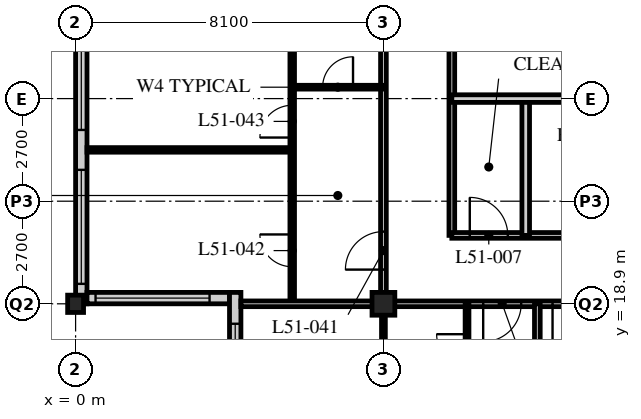
"""IFC4 building model, lengths in metres.
Left out: names, types, materials, properties, quantities, classifications, styles, units other than length and angle.
Written with IfcOpenShell. Run it as: python <this file> out.ifc"""

import sys

from ifc_helpers import new_model, si_unit, direction, frame, frame_2d, origin, origin_2d, place, context, subcontext, project, spatial, rectangle, hollow_rectangle, i_section, extrude, element, fill, save


model = new_model("IFC4")
c1 = context("Model", 3, precision=1e-05, world=origin(), true_north=direction((0.0, 1.0)))
c2 = subcontext(c1, "Body", "Model", "MODEL_VIEW")
j1 = project(units=[si_unit("LENGTHUNIT", "METRE"), si_unit("PLANEANGLEUNIT", "RADIAN")], contexts=[c1])
p1 = place(None, origin())
s1 = spatial("IfcSite", under=j1, at=p1, CompositionType="ELEMENT")
p2 = place(p1, origin())
s2 = spatial("IfcBuilding", under=s1, at=p2, CompositionType="ELEMENT")
p3 = place(p2, frame((0.0, 0.0, 199.2)))
s3 = spatial("IfcBuildingStorey", under=s2, at=p3, CompositionType="ELEMENT", Elevation=199.2)
p4 = place(p3, frame((0.0, 18.9, 0.0), z_axis=(0.0, 0.0, 1.0), x_axis=(1.0, 0.0, 0.0)))
e1 = element("IfcColumn", 1, at=p4, inside=s3, PredefinedType="COLUMN", context=c2, shape_type="SweptSolid", body=[
    extrude(i_section(OverallWidth=0.418, OverallDepth=0.456, WebThickness=0.042, FlangeThickness=0.067, FilletRadius=0.015, at=origin_2d()), origin(), (0.0, 0.0, 1.0), 3.6),
])
p5 = place(p3, frame((8.1, 18.9, 0.0), z_axis=(0.0, 0.0, 1.0), x_axis=(1.0, 0.0, 0.0)))
e2 = element("IfcColumn", 2, at=p5, inside=s3, PredefinedType="COLUMN", context=c2, shape_type="SweptSolid", body=[
    extrude(hollow_rectangle(XDim=0.6, YDim=0.6, WallThickness=0.05, at=origin_2d()), origin(), (0.0, 0.0, 1.0), 3.6),
])
p6 = place(p3, frame((0.15, 51.0, 0.0), z_axis=(0.0, 0.0, 1.0), x_axis=(0.0, -1.0, 0.0)))
e3 = element("IfcWall", 3, at=p6, inside=s3, PredefinedType="SOLIDWALL", context=c2, shape_type="SweptSolid", body=[
    extrude(rectangle(XDim=32.1, YDim=0.3, at=frame_2d((16.05, 0.0))), origin(), (0.0, 0.0, 1.0), 3.39),
])
p7 = place(p6, frame((0.225, 0.0, 0.6)))
e4 = element("IfcOpeningElement", 4, at=p7, cuts=e3, PredefinedType="OPENING", context=c2, shape_type="SweptSolid", body=[
    extrude(rectangle(XDim=3.0, YDim=2.4, at=frame_2d((1.5, 1.2))), frame((0.0, 0.16, 0.0), z_axis=(0.0, -1.0, 0.0), x_axis=(1.0, 0.0, 0.0)), (0.0, 0.0, 1.0), 0.32),
])
p8 = place(p6, frame((4.275, 0.0, 0.6)))
e5 = element("IfcOpeningElement", 5, at=p8, cuts=e3, PredefinedType="OPENING", context=c2, shape_type="SweptSolid", body=[
    extrude(rectangle(XDim=3.0, YDim=2.4, at=frame_2d((1.5, 1.2))), frame((0.0, 0.16, 0.0), z_axis=(0.0, -1.0, 0.0), x_axis=(1.0, 0.0, 0.0)), (0.0, 0.0, 1.0), 0.32),
])
p9 = place(p6, frame((8.325, 0.0, 0.6)))
e6 = element("IfcOpeningElement", 6, at=p9, cuts=e3, PredefinedType="OPENING", context=c2, shape_type="SweptSolid", body=[
    extrude(rectangle(XDim=3.0, YDim=2.4, at=frame_2d((1.5, 1.2))), frame((0.0, 0.16, 0.0), z_axis=(0.0, -1.0, 0.0), x_axis=(1.0, 0.0, 0.0)), (0.0, 0.0, 1.0), 0.32),
])
p10 = place(p6, frame((12.375, 0.0, 0.6)))
e7 = element("IfcOpeningElement", 7, at=p10, cuts=e3, PredefinedType="OPENING", context=c2, shape_type="SweptSolid", body=[
    extrude(rectangle(XDim=3.0, YDim=2.4, at=frame_2d((1.5, 1.2))), frame((0.0, 0.16, 0.0), z_axis=(0.0, -1.0, 0.0), x_axis=(1.0, 0.0, 0.0)), (0.0, 0.0, 1.0), 0.32),
])
p11 = place(p6, frame((16.425, 0.0, 0.6)))
e8 = element("IfcOpeningElement", 8, at=p11, cuts=e3, PredefinedType="OPENING", context=c2, shape_type="SweptSolid", body=[
    extrude(rectangle(XDim=3.0, YDim=2.4, at=frame_2d((1.5, 1.2))), frame((0.0, 0.16, 0.0), z_axis=(0.0, -1.0, 0.0), x_axis=(1.0, 0.0, 0.0)), (0.0, 0.0, 1.0), 0.32),
])
p12 = place(p6, frame((20.475, 0.0, 0.6)))
e9 = element("IfcOpeningElement", 9, at=p12, cuts=e3, PredefinedType="OPENING", context=c2, shape_type="SweptSolid", body=[
    extrude(rectangle(XDim=3.0, YDim=2.4, at=frame_2d((1.5, 1.2))), frame((0.0, 0.16, 0.0), z_axis=(0.0, -1.0, 0.0), x_axis=(1.0, 0.0, 0.0)), (0.0, 0.0, 1.0), 0.32),
])
p13 = place(p6, frame((24.525, 0.0, 0.6)))
e10 = element("IfcOpeningElement", 10, at=p13, cuts=e3, PredefinedType="OPENING", context=c2, shape_type="SweptSolid", body=[
    extrude(rectangle(XDim=3.0, YDim=2.4, at=frame_2d((1.5, 1.2))), frame((0.0, 0.16, 0.0), z_axis=(0.0, -1.0, 0.0), x_axis=(1.0, 0.0, 0.0)), (0.0, 0.0, 1.0), 0.32),
])
p14 = place(p6, frame((28.575, 0.0, 0.6)))
e11 = element("IfcOpeningElement", 11, at=p14, cuts=e3, PredefinedType="OPENING", context=c2, shape_type="SweptSolid", body=[
    extrude(rectangle(XDim=3.0, YDim=2.4, at=frame_2d((1.5, 1.2))), frame((0.0, 0.16, 0.0), z_axis=(0.0, -1.0, 0.0), x_axis=(1.0, 0.0, 0.0)), (0.0, 0.0, 1.0), 0.32),
])
p15 = place(p3, frame((0.3, 19.05, 0.0), z_axis=(0.0, 0.0, 1.0), x_axis=(1.0, 0.0, 0.0)))
e12 = element("IfcWall", 12, at=p15, inside=s3, PredefinedType="SOLIDWALL", context=c2, shape_type="SweptSolid", body=[
    extrude(rectangle(XDim=3.75, YDim=0.3, at=frame_2d((1.875, 0.0))), origin(), (0.0, 0.0, 1.0), 3.39),
])
p16 = place(p15, frame((0.225, 0.0, 0.6)))
e13 = element("IfcOpeningElement", 13, at=p16, cuts=e12, PredefinedType="OPENING", context=c2, shape_type="SweptSolid", body=[
    extrude(rectangle(XDim=3.0, YDim=2.0, at=frame_2d((1.5, 1.0))), frame((0.0, 0.16, 0.0), z_axis=(0.0, -1.0, 0.0), x_axis=(1.0, 0.0, 0.0)), (0.0, 0.0, 1.0), 0.32),
])
p17 = place(p3, frame((4.2, 19.2, 0.0), z_axis=(0.0, 0.0, 1.0), x_axis=(0.0, -1.0, 0.0)))
e14 = element("IfcWall", 14, at=p17, inside=s3, PredefinedType="SOLIDWALL", context=c2, shape_type="SweptSolid", body=[
    extrude(rectangle(XDim=4.35, YDim=0.3, at=frame_2d((2.175, 0.0))), origin(), (0.0, 0.0, 1.0), 3.39),
])
p18 = place(p17, frame((0.825, 0.0, 0.6)))
e15 = element("IfcOpeningElement", 15, at=p18, cuts=e14, PredefinedType="OPENING", context=c2, shape_type="SweptSolid", body=[
    extrude(rectangle(XDim=3.0, YDim=2.0, at=frame_2d((1.5, 1.0))), frame((0.0, 0.16, 0.0), z_axis=(0.0, -1.0, 0.0), x_axis=(1.0, 0.0, 0.0)), (0.0, 0.0, 1.0), 0.32),
])
p19 = place(p3, frame((8.1, 18.9, 0.0), z_axis=(0.0, 0.0, 1.0), x_axis=(1.0, 0.0, 0.0)))
e16 = element("IfcWall", 16, at=p19, inside=s3, PredefinedType="PARTITIONING", context=c2, shape_type="SweptSolid", body=[
    extrude(rectangle(XDim=40.5, YDim=0.15, at=frame_2d((20.25, 0.0))), origin(), (0.0, 0.0, 1.0), 2.778),
])
p20 = place(p19, frame((4.45, 0.0, 0.0)))
e17 = element("IfcOpeningElement", 17, at=p20, cuts=e16, PredefinedType="OPENING", context=c2, shape_type="SweptSolid", body=[
    extrude(rectangle(XDim=1.0, YDim=2.1, at=frame_2d((0.5, 1.05))), frame((0.0, 0.085, 0.0), z_axis=(0.0, -1.0, 0.0), x_axis=(1.0, 0.0, 0.0)), (0.0, 0.0, 1.0), 0.17),
])
p21 = place(p19, frame((17.1, 0.0, 0.0)))
e18 = element("IfcOpeningElement", 18, at=p21, cuts=e16, PredefinedType="OPENING", context=c2, shape_type="SweptSolid", body=[
    extrude(rectangle(XDim=1.0, YDim=2.1, at=frame_2d((0.5, 1.05))), frame((0.0, 0.085, 0.0), z_axis=(0.0, -1.0, 0.0), x_axis=(1.0, 0.0, 0.0)), (0.0, 0.0, 1.0), 0.17),
])
p22 = place(p19, frame((28.75, 0.0, 0.0)))
e19 = element("IfcOpeningElement", 19, at=p22, cuts=e16, PredefinedType="OPENING", context=c2, shape_type="SweptSolid", body=[
    extrude(rectangle(XDim=1.0, YDim=2.1, at=frame_2d((0.5, 1.05))), frame((0.0, 0.085, 0.0), z_axis=(0.0, -1.0, 0.0), x_axis=(1.0, 0.0, 0.0)), (0.0, 0.0, 1.0), 0.17),
])
p23 = place(p19, frame((2.625, 0.0, 0.0)))
e20 = element("IfcOpeningElement", 20, at=p23, cuts=e16, PredefinedType="OPENING", context=c2, shape_type="SweptSolid", body=[
    extrude(rectangle(XDim=1.0, YDim=2.1, at=frame_2d((0.5, 1.05))), frame((0.0, 0.085, 0.0), z_axis=(0.0, -1.0, 0.0), x_axis=(1.0, 0.0, 0.0)), (0.0, 0.0, 1.0), 0.17),
])
p24 = place(p19, frame((36.875, 0.0, 0.0)))
e21 = element("IfcOpeningElement", 21, at=p24, cuts=e16, PredefinedType="OPENING", context=c2, shape_type="SweptSolid", body=[
    extrude(rectangle(XDim=1.0, YDim=2.1, at=frame_2d((0.5, 1.05))), frame((0.0, 0.085, 0.0), z_axis=(0.0, -1.0, 0.0), x_axis=(1.0, 0.0, 0.0)), (0.0, 0.0, 1.0), 0.17),
])
p25 = place(p3, frame((8.1, 18.9, 0.0), z_axis=(0.0, 0.0, 1.0), x_axis=(0.0, 1.0, 0.0)))
e22 = element("IfcWall", 22, at=p25, inside=s3, PredefinedType="PARTITIONING", context=c2, shape_type="SweptSolid", body=[
    extrude(rectangle(XDim=24.3, YDim=0.15, at=frame_2d((12.15, 0.0))), origin(), (0.0, 0.0, 1.0), 2.778),
])
p26 = place(p25, frame((0.9, 0.0, 0.0)))
e23 = element("IfcOpeningElement", 23, at=p26, cuts=e22, PredefinedType="OPENING", context=c2, shape_type="SweptSolid", body=[
    extrude(rectangle(XDim=1.0, YDim=2.1, at=frame_2d((0.5, 1.05))), frame((0.0, 0.085, 0.0), z_axis=(0.0, -1.0, 0.0), x_axis=(1.0, 0.0, 0.0)), (0.0, 0.0, 1.0), 0.17),
])
p27 = place(p25, frame((9.0, 0.0, 0.0)))
e24 = element("IfcOpeningElement", 24, at=p27, cuts=e22, PredefinedType="OPENING", context=c2, shape_type="SweptSolid", body=[
    extrude(rectangle(XDim=1.0, YDim=2.1, at=frame_2d((0.5, 1.05))), frame((0.0, 0.085, 0.0), z_axis=(0.0, -1.0, 0.0), x_axis=(1.0, 0.0, 0.0)), (0.0, 0.0, 1.0), 0.17),
])
p28 = place(p25, frame((17.1, 0.0, 0.0)))
e25 = element("IfcOpeningElement", 25, at=p28, cuts=e22, PredefinedType="OPENING", context=c2, shape_type="SweptSolid", body=[
    extrude(rectangle(XDim=1.0, YDim=2.1, at=frame_2d((0.5, 1.05))), frame((0.0, 0.085, 0.0), z_axis=(0.0, -1.0, 0.0), x_axis=(1.0, 0.0, 0.0)), (0.0, 0.0, 1.0), 0.17),
])
p29 = place(p3, frame((9.9, 40.5, 0.0), z_axis=(0.0, 0.0, 1.0), x_axis=(0.0, -1.0, 0.0)))
e26 = element("IfcWall", 26, at=p29, inside=s3, PredefinedType="PARTITIONING", context=c2, shape_type="SweptSolid", body=[
    extrude(rectangle(XDim=19.8, YDim=0.15, at=frame_2d((9.9, 0.0))), origin(), (0.0, 0.0, 1.0), 3.39),
])
p30 = place(p29, frame((11.65, 0.0, 0.0)))
e27 = element("IfcOpeningElement", 27, at=p30, cuts=e26, PredefinedType="OPENING", context=c2, shape_type="SweptSolid", body=[
    extrude(rectangle(XDim=1.0, YDim=2.1, at=frame_2d((0.5, 1.05))), frame((0.0, 0.085, 0.0), z_axis=(0.0, -1.0, 0.0), x_axis=(1.0, 0.0, 0.0)), (0.0, 0.0, 1.0), 0.17),
])
p31 = place(p29, frame((3.55, 0.0, 0.0)))
e28 = element("IfcOpeningElement", 28, at=p31, cuts=e26, PredefinedType="OPENING", context=c2, shape_type="SweptSolid", body=[
    extrude(rectangle(XDim=1.0, YDim=2.1, at=frame_2d((0.5, 1.05))), frame((0.0, 0.085, 0.0), z_axis=(0.0, -1.0, 0.0), x_axis=(1.0, 0.0, 0.0)), (0.0, 0.0, 1.0), 0.17),
])
p32 = place(p3, frame((9.9, 20.7, 0.0), z_axis=(0.0, 0.0, 1.0), x_axis=(1.0, 0.0, 0.0)))
e29 = element("IfcWall", 29, at=p32, inside=s3, PredefinedType="PARTITIONING", context=c2, shape_type="SweptSolid", body=[
    extrude(rectangle(XDim=17.24, YDim=0.15, at=frame_2d((8.62, 0.0))), origin(), (0.0, 0.0, 1.0), 3.39),
])
p33 = place(p32, frame((0.472, 0.0, 0.0)))
e30 = element("IfcOpeningElement", 30, at=p33, cuts=e29, PredefinedType="OPENING", context=c2, shape_type="SweptSolid", body=[
    extrude(rectangle(XDim=1.0, YDim=2.1, at=frame_2d((0.5, 1.05))), frame((0.0, 0.085, 0.0), z_axis=(0.0, -1.0, 0.0), x_axis=(1.0, 0.0, 0.0)), (0.0, 0.0, 1.0), 0.17),
])
p34 = place(p32, frame((3.622, 0.0, 0.0)))
e31 = element("IfcOpeningElement", 31, at=p34, cuts=e29, PredefinedType="OPENING", context=c2, shape_type="SweptSolid", body=[
    extrude(rectangle(XDim=1.0, YDim=2.1, at=frame_2d((0.5, 1.05))), frame((0.0, 0.085, 0.0), z_axis=(0.0, -1.0, 0.0), x_axis=(1.0, 0.0, 0.0)), (0.0, 0.0, 1.0), 0.17),
])
p35 = place(p32, frame((9.828, 0.0, 0.0)))
e32 = element("IfcOpeningElement", 32, at=p35, cuts=e29, PredefinedType="OPENING", context=c2, shape_type="SweptSolid", body=[
    extrude(rectangle(XDim=1.0, YDim=2.1, at=frame_2d((0.5, 1.05))), frame((0.0, 0.085, 0.0), z_axis=(0.0, -1.0, 0.0), x_axis=(1.0, 0.0, 0.0)), (0.0, 0.0, 1.0), 0.17),
])
p36 = place(p32, frame((15.303, 0.0, 0.0)))
e33 = element("IfcOpeningElement", 33, at=p36, cuts=e29, PredefinedType="OPENING", context=c2, shape_type="SweptSolid", body=[
    extrude(rectangle(XDim=1.0, YDim=2.1, at=frame_2d((0.5, 1.05))), frame((0.0, 0.085, 0.0), z_axis=(0.0, -1.0, 0.0), x_axis=(1.0, 0.0, 0.0)), (0.0, 0.0, 1.0), 0.17),
])
p37 = place(p3, frame((11.844, 20.7, 0.0), z_axis=(0.0, 0.0, 1.0), x_axis=(0.0, 1.0, 0.0)))
e34 = element("IfcWall", 34, at=p37, inside=s3, PredefinedType="SOLIDWALL", context=c2, shape_type="SweptSolid", body=[
    extrude(rectangle(XDim=3.6, YDim=0.2, at=frame_2d((1.8, 0.0))), origin(), (0.0, 0.0, 1.0), 3.39),
])
p38 = place(p3, frame((9.9, 24.3, 0.0), z_axis=(0.0, 0.0, 1.0), x_axis=(1.0, 0.0, 0.0)))
e35 = element("IfcWall", 35, at=p38, inside=s3, PredefinedType="SOLIDWALL", context=c2, shape_type="SweptSolid", body=[
    extrude(rectangle(XDim=6.3, YDim=0.2, at=frame_2d((3.15, 0.0))), origin(), (0.0, 0.0, 1.0), 3.39),
])
p39 = place(p3, frame((5.7, 18.9, 0.0), z_axis=(0.0, 0.0, 1.0), x_axis=(0.0, 1.0, 0.0)))
e36 = element("IfcWall", 36, at=p39, inside=s3, PredefinedType="PARTITIONING", context=c2, shape_type="SweptSolid", body=[
    extrude(rectangle(XDim=24.3, YDim=0.12, at=frame_2d((12.15, 0.0))), origin(), (0.0, 0.0, 1.0), 3.39),
])
p40 = place(p39, frame((0.975, 0.0, 0.0)))
e37 = element("IfcOpeningElement", 37, at=p40, cuts=e36, PredefinedType="OPENING", context=c2, shape_type="SweptSolid", body=[
    extrude(rectangle(XDim=0.85, YDim=2.1, at=frame_2d((0.425, 1.05))), frame((0.0, 0.07, 0.0), z_axis=(0.0, -1.0, 0.0), x_axis=(1.0, 0.0, 0.0)), (0.0, 0.0, 1.0), 0.14),
])
p41 = place(p39, frame((4.375, 0.0, 0.0)))
e38 = element("IfcOpeningElement", 38, at=p41, cuts=e36, PredefinedType="OPENING", context=c2, shape_type="SweptSolid", body=[
    extrude(rectangle(XDim=0.85, YDim=2.1, at=frame_2d((0.425, 1.05))), frame((0.0, 0.07, 0.0), z_axis=(0.0, -1.0, 0.0), x_axis=(1.0, 0.0, 0.0)), (0.0, 0.0, 1.0), 0.14),
])
p42 = place(p39, frame((9.075, 0.0, 0.0)))
e39 = element("IfcOpeningElement", 39, at=p42, cuts=e36, PredefinedType="OPENING", context=c2, shape_type="SweptSolid", body=[
    extrude(rectangle(XDim=0.85, YDim=2.1, at=frame_2d((0.425, 1.05))), frame((0.0, 0.07, 0.0), z_axis=(0.0, -1.0, 0.0), x_axis=(1.0, 0.0, 0.0)), (0.0, 0.0, 1.0), 0.14),
])
p43 = place(p39, frame((12.475, 0.0, 0.0)))
e40 = element("IfcOpeningElement", 40, at=p43, cuts=e36, PredefinedType="OPENING", context=c2, shape_type="SweptSolid", body=[
    extrude(rectangle(XDim=0.85, YDim=2.1, at=frame_2d((0.425, 1.05))), frame((0.0, 0.07, 0.0), z_axis=(0.0, -1.0, 0.0), x_axis=(1.0, 0.0, 0.0)), (0.0, 0.0, 1.0), 0.14),
])
p44 = place(p39, frame((17.175, 0.0, 0.0)))
e41 = element("IfcOpeningElement", 41, at=p44, cuts=e36, PredefinedType="OPENING", context=c2, shape_type="SweptSolid", body=[
    extrude(rectangle(XDim=0.85, YDim=2.1, at=frame_2d((0.425, 1.05))), frame((0.0, 0.07, 0.0), z_axis=(0.0, -1.0, 0.0), x_axis=(1.0, 0.0, 0.0)), (0.0, 0.0, 1.0), 0.14),
])
p45 = place(p39, frame((20.575, 0.0, 0.0)))
e42 = element("IfcOpeningElement", 42, at=p45, cuts=e36, PredefinedType="OPENING", context=c2, shape_type="SweptSolid", body=[
    extrude(rectangle(XDim=0.85, YDim=2.1, at=frame_2d((0.425, 1.05))), frame((0.0, 0.07, 0.0), z_axis=(0.0, -1.0, 0.0), x_axis=(1.0, 0.0, 0.0)), (0.0, 0.0, 1.0), 0.14),
])
p46 = place(p3, frame((8.1, 24.6, 0.0), z_axis=(0.0, 0.0, 1.0), x_axis=(-1.0, 0.0, 0.0)))
e43 = element("IfcWall", 43, at=p46, inside=s3, PredefinedType="PARTITIONING", context=c2, shape_type="SweptSolid", body=[
    extrude(rectangle(XDim=2.4, YDim=0.1, at=frame_2d((1.2, 0.0))), origin(), (0.0, 0.0, 1.0), 3.39),
])
p47 = place(p46, frame((0.8, 0.0, 0.0)))
e44 = element("IfcOpeningElement", 44, at=p47, cuts=e43, PredefinedType="OPENING", context=c2, shape_type="SweptSolid", body=[
    extrude(rectangle(XDim=0.8, YDim=2.1, at=frame_2d((0.4, 1.05))), frame((0.0, 0.06, 0.0), z_axis=(0.0, -1.0, 0.0), x_axis=(1.0, 0.0, 0.0)), (0.0, 0.0, 1.0), 0.12),
])
p48 = place(p3, frame((5.7, 22.95, 0.0), z_axis=(0.0, 0.0, 1.0), x_axis=(-1.0, 0.0, 0.0)))
e45 = element("IfcWall", 45, at=p48, inside=s3, PredefinedType="PARTITIONING", context=c2, shape_type="SweptSolid", body=[
    extrude(rectangle(XDim=5.4, YDim=0.12, at=frame_2d((2.7, 0.0))), origin(), (0.0, 0.0, 1.0), 3.39),
])
p49 = place(p3, frame((10.3, 18.9, 0.0), z_axis=(0.0, 0.0, 1.0), x_axis=(0.0, -1.0, 0.0)))
e46 = element("IfcWall", 46, at=p49, inside=s3, PredefinedType="PARTITIONING", context=c2, shape_type="SweptSolid", body=[
    extrude(rectangle(XDim=2.4, YDim=0.1, at=frame_2d((1.2, 0.0))), origin(), (0.0, 0.0, 1.0), 3.39),
])
p50 = place(p49, frame((0.8, 0.0, 0.0)))
e47 = element("IfcOpeningElement", 47, at=p50, cuts=e46, PredefinedType="OPENING", context=c2, shape_type="SweptSolid", body=[
    extrude(rectangle(XDim=0.8, YDim=2.1, at=frame_2d((0.4, 1.05))), frame((0.0, 0.06, 0.0), z_axis=(0.0, -1.0, 0.0), x_axis=(1.0, 0.0, 0.0)), (0.0, 0.0, 1.0), 0.12),
])
p51 = place(p3, frame((8.1, 18.9, 0.0), z_axis=(0.0, 0.0, 1.0), x_axis=(0.0, -1.0, 0.0)))
e48 = element("IfcWall", 48, at=p51, inside=s3, PredefinedType="PARTITIONING", context=c2, shape_type="SweptSolid", body=[
    extrude(rectangle(XDim=2.4, YDim=0.1, at=frame_2d((1.2, 0.0))), origin(), (0.0, 0.0, 1.0), 2.778),
])
p52 = place(p3, frame((4.35, 18.9, 0.0), z_axis=(0.0, 0.0, 1.0), x_axis=(1.0, 0.0, 0.0)))
e49 = element("IfcWall", 49, at=p52, inside=s3, PredefinedType="PARTITIONING", context=c2, shape_type="SweptSolid", body=[
    extrude(rectangle(XDim=3.75, YDim=0.15, at=frame_2d((1.875, 0.0))), origin(), (0.0, 0.0, 1.0), 2.778),
])
p53 = place(p3, frame((12.15, 18.9, 0.0), z_axis=(0.0, 0.0, 1.0), x_axis=(0.0, -1.0, 0.0)))
e50 = element("IfcWall", 50, at=p53, inside=s3, PredefinedType="PARTITIONING", context=c2, shape_type="SweptSolid", body=[
    extrude(rectangle(XDim=7.8, YDim=0.15, at=frame_2d((3.9, 0.0))), origin(), (0.0, 0.0, 1.0), 3.39),
])
p54 = place(p13, origin())
e51 = element("IfcWindow", 51, at=p54, inside=s3, PartitioningType="SINGLE_PANEL", PredefinedType="WINDOW", context=c2, shape_type="SweptSolid", body=[
    extrude(rectangle(XDim=3.0, YDim=2.4, at=frame_2d((1.5, 1.2))), frame((0.0, 0.03, 0.0), z_axis=(0.0, -1.0, 0.0), x_axis=(1.0, 0.0, 0.0)), (0.0, 0.0, 1.0), 0.06),
])
fill(e10, e51)
p55 = place(p14, origin())
e52 = element("IfcWindow", 52, at=p55, inside=s3, PartitioningType="SINGLE_PANEL", PredefinedType="WINDOW", context=c2, shape_type="SweptSolid", body=[
    extrude(rectangle(XDim=3.0, YDim=2.4, at=frame_2d((1.5, 1.2))), frame((0.0, 0.03, 0.0), z_axis=(0.0, -1.0, 0.0), x_axis=(1.0, 0.0, 0.0)), (0.0, 0.0, 1.0), 0.06),
])
fill(e11, e52)
p56 = place(p16, origin())
e53 = element("IfcWindow", 53, at=p56, inside=s3, PartitioningType="SINGLE_PANEL", PredefinedType="WINDOW", context=c2, shape_type="SweptSolid", body=[
    extrude(rectangle(XDim=3.0, YDim=2.0, at=frame_2d((1.5, 1.0))), frame((0.0, 0.03, 0.0), z_axis=(0.0, -1.0, 0.0), x_axis=(1.0, 0.0, 0.0)), (0.0, 0.0, 1.0), 0.06),
])
fill(e13, e53)
p57 = place(p18, origin())
e54 = element("IfcWindow", 54, at=p57, inside=s3, PartitioningType="SINGLE_PANEL", PredefinedType="WINDOW", context=c2, shape_type="SweptSolid", body=[
    extrude(rectangle(XDim=3.0, YDim=2.0, at=frame_2d((1.5, 1.0))), frame((0.0, 0.03, 0.0), z_axis=(0.0, -1.0, 0.0), x_axis=(1.0, 0.0, 0.0)), (0.0, 0.0, 1.0), 0.06),
])
fill(e15, e54)
p58 = place(p33, origin())
e55 = element("IfcDoor", 55, at=p58, inside=s3, OperationType="SINGLE_SWING_LEFT", PredefinedType="DOOR", context=c2, shape_type="SweptSolid", body=[
    extrude(rectangle(XDim=1.0, YDim=2.1, at=frame_2d((0.5, 1.05))), frame((0.0, 0.025, 0.0), z_axis=(0.0, -1.0, 0.0), x_axis=(1.0, 0.0, 0.0)), (0.0, 0.0, 1.0), 0.05),
])
fill(e30, e55)
p59 = place(p20, origin())
e56 = element("IfcDoor", 56, at=p59, inside=s3, OperationType="SINGLE_SWING_RIGHT", PredefinedType="DOOR", context=c2, shape_type="SweptSolid", body=[
    extrude(rectangle(XDim=1.0, YDim=2.1, at=frame_2d((0.5, 1.05))), frame((0.0, 0.025, 0.0), z_axis=(0.0, -1.0, 0.0), x_axis=(1.0, 0.0, 0.0)), (0.0, 0.0, 1.0), 0.05),
])
fill(e17, e56)
p60 = place(p47, origin())
e57 = element("IfcDoor", 57, at=p60, inside=s3, OperationType="SINGLE_SWING_RIGHT", PredefinedType="DOOR", context=c2, shape_type="SweptSolid", body=[
    extrude(rectangle(XDim=0.8, YDim=2.1, at=frame_2d((0.4, 1.05))), frame((0.0, 0.025, 0.0), z_axis=(0.0, -1.0, 0.0), x_axis=(1.0, 0.0, 0.0)), (0.0, 0.0, 1.0), 0.05),
])
fill(e44, e57)
p61 = place(p26, origin())
e58 = element("IfcDoor", 58, at=p61, inside=s3, OperationType="SINGLE_SWING_LEFT", PredefinedType="DOOR", context=c2, shape_type="SweptSolid", body=[
    extrude(rectangle(XDim=1.0, YDim=2.1, at=frame_2d((0.5, 1.05))), frame((0.0, 0.025, 0.0), z_axis=(0.0, -1.0, 0.0), x_axis=(1.0, 0.0, 0.0)), (0.0, 0.0, 1.0), 0.05),
])
fill(e23, e58)
p62 = place(p40, origin())
e59 = element("IfcDoor", 59, at=p62, inside=s3, OperationType="SINGLE_SWING_RIGHT", PredefinedType="DOOR", context=c2, shape_type="SweptSolid", body=[
    extrude(rectangle(XDim=0.85, YDim=2.1, at=frame_2d((0.425, 1.05))), frame((0.0, 0.025, 0.0), z_axis=(0.0, -1.0, 0.0), x_axis=(1.0, 0.0, 0.0)), (0.0, 0.0, 1.0), 0.05),
])
fill(e37, e59)
p63 = place(p41, origin())
e60 = element("IfcDoor", 60, at=p63, inside=s3, OperationType="SINGLE_SWING_LEFT", PredefinedType="DOOR", context=c2, shape_type="SweptSolid", body=[
    extrude(rectangle(XDim=0.85, YDim=2.1, at=frame_2d((0.425, 1.05))), frame((0.0, 0.025, 0.0), z_axis=(0.0, -1.0, 0.0), x_axis=(1.0, 0.0, 0.0)), (0.0, 0.0, 1.0), 0.05),
])
fill(e38, e60)
p64 = place(p50, origin())
e61 = element("IfcDoor", 61, at=p64, inside=s3, OperationType="SINGLE_SWING_RIGHT", PredefinedType="DOOR", context=c2, shape_type="SweptSolid", body=[
    extrude(rectangle(XDim=0.8, YDim=2.1, at=frame_2d((0.4, 1.05))), frame((0.0, 0.025, 0.0), z_axis=(0.0, -1.0, 0.0), x_axis=(1.0, 0.0, 0.0)), (0.0, 0.0, 1.0), 0.05),
])
fill(e47, e61)
p65 = place(p23, origin())
e62 = element("IfcDoor", 62, at=p65, inside=s3, OperationType="SINGLE_SWING_RIGHT", PredefinedType="DOOR", context=c2, shape_type="SweptSolid", body=[
    extrude(rectangle(XDim=1.0, YDim=2.1, at=frame_2d((0.5, 1.05))), frame((0.0, 0.025, 0.0), z_axis=(0.0, -1.0, 0.0), x_axis=(1.0, 0.0, 0.0)), (0.0, 0.0, 1.0), 0.05),
])
fill(e20, e62)
save(model, sys.argv[1])
